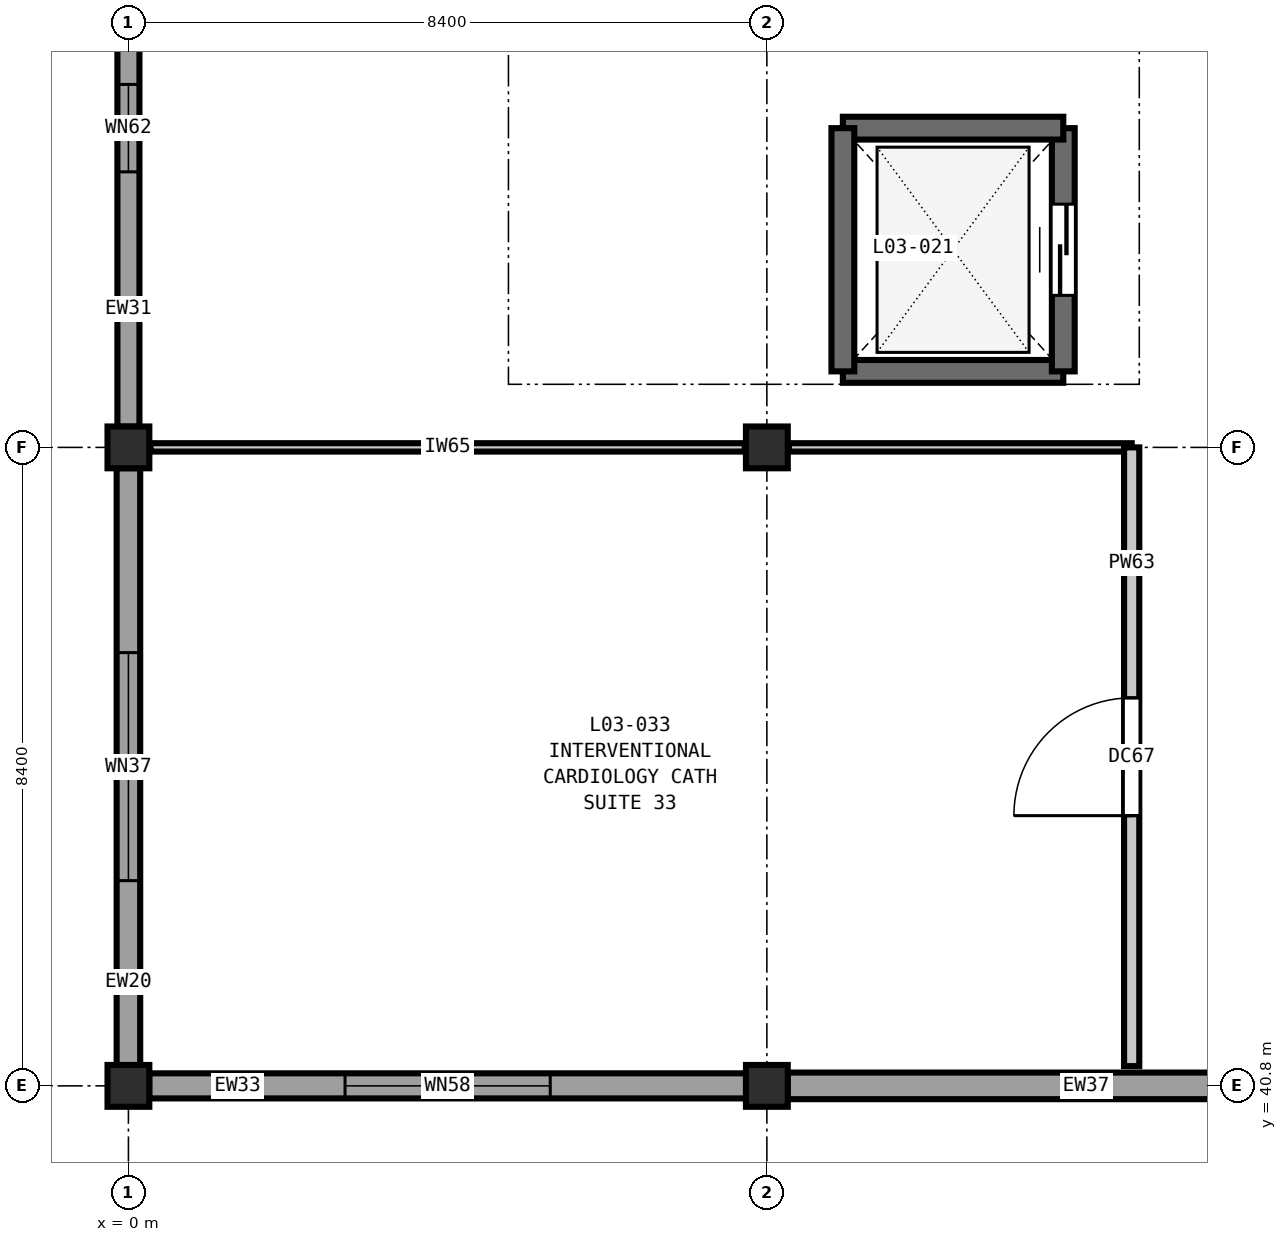
"""IFC4 building model, lengths in metres.
Left out: names, types, materials, properties, quantities, classifications, styles, units other than length and angle.
Written with IfcOpenShell. Run it as: python <this file> out.ifc"""

import sys

from ifc_helpers import new_model, si_unit, direction, frame, frame_2d, origin, origin_2d, place, context, subcontext, project, spatial, rectangle, extrude, element, fill, save


model = new_model("IFC4")
c1 = context("Model", 3, precision=1e-05, world=origin(), true_north=direction((0.0, 1.0)))
c2 = subcontext(c1, "Body", "Model", "MODEL_VIEW")
j1 = project(units=[si_unit("LENGTHUNIT", "METRE"), si_unit("PLANEANGLEUNIT", "RADIAN")], contexts=[c1])
p1 = place(None, origin())
s1 = spatial("IfcSite", under=j1, at=p1, CompositionType="ELEMENT")
p2 = place(p1, origin())
s2 = spatial("IfcBuilding", under=s1, at=p2, CompositionType="ELEMENT")
p3 = place(p2, frame((0.0, 0.0, 16.2)))
s3 = spatial("IfcBuildingStorey", under=s2, at=p3, CompositionType="ELEMENT", Elevation=16.2)
for number, where, z_axis, x_axis in (
    (1, (0.0, 40.8, 0.0), (0.0, 0.0, 1.0), (1.0, 0.0, 0.0)),
    (2, (0.0, 49.2, 0.0), (0.0, 0.0, 1.0), (1.0, 0.0, 0.0)),
    (3, (8.4, 40.8, 0.0), (0.0, 0.0, 1.0), (1.0, 0.0, 0.0)),
    (4, (8.4, 49.2, 0.0), (0.0, 0.0, 1.0), (1.0, 0.0, 0.0)),
):
    element("IfcColumn", number, at=place(p3, frame(where, z_axis=z_axis, x_axis=x_axis)), inside=s3, PredefinedType="COLUMN", context=c2, shape_type="SweptSolid", body=[
        extrude(rectangle(XDim=0.55, YDim=0.55, at=origin_2d()), origin(), (0.0, 0.0, 1.0), 4.2),
    ])
p4 = place(p3, frame((16.527, 40.8, 0.0), z_axis=(0.0, 0.0, 1.0), x_axis=(-1.0, 0.0, 0.0)))
e5 = element("IfcWall", 5, at=p4, inside=s3, PredefinedType="SOLIDWALL", context=c2, shape_type="SweptSolid", body=[
    extrude(rectangle(XDim=7.854, YDim=0.35, at=frame_2d((3.927, 0.0))), origin(), (0.0, 0.0, 1.0), 3.48),
])
p5 = place(p3, frame((8.127, 40.8, 0.0), z_axis=(0.0, 0.0, 1.0), x_axis=(-1.0, 0.0, 0.0)))
e6 = element("IfcWall", 6, at=p5, inside=s3, PredefinedType="SOLIDWALL", context=c2, shape_type="SweptSolid", body=[
    extrude(rectangle(XDim=7.854, YDim=0.33, at=frame_2d((3.927, 0.0))), origin(), (0.0, 0.0, 1.0), 3.48),
])
p6 = place(p5, frame((2.577, 0.0, 0.9)))
e7 = element("IfcOpeningElement", 7, at=p6, cuts=e6, PredefinedType="OPENING", context=c2, shape_type="SweptSolid", body=[
    extrude(rectangle(XDim=2.7, YDim=2.15, at=frame_2d((1.35, 1.075))), frame((0.0, 0.175, 0.0), z_axis=(0.0, -1.0, 0.0), x_axis=(1.0, 0.0, 0.0)), (0.0, 0.0, 1.0), 0.35),
])
p7 = place(p3, frame((0.0, 41.073, 0.0), z_axis=(0.0, 0.0, 1.0), x_axis=(0.0, 1.0, 0.0)))
e8 = element("IfcWall", 8, at=p7, inside=s3, PredefinedType="SOLIDWALL", context=c2, shape_type="SweptSolid", body=[
    extrude(rectangle(XDim=7.854, YDim=0.31, at=frame_2d((3.927, 0.0))), origin(), (0.0, 0.0, 1.0), 3.48),
])
p8 = place(p7, frame((2.427, 0.0, 0.9)))
e9 = element("IfcOpeningElement", 9, at=p8, cuts=e8, PredefinedType="OPENING", context=c2, shape_type="SweptSolid", body=[
    extrude(rectangle(XDim=3.0, YDim=2.15, at=frame_2d((1.5, 1.075))), frame((0.0, 0.165, 0.0), z_axis=(0.0, -1.0, 0.0), x_axis=(1.0, 0.0, 0.0)), (0.0, 0.0, 1.0), 0.33),
])
p9 = place(p3, frame((0.0, 49.473, 0.0), z_axis=(0.0, 0.0, 1.0), x_axis=(0.0, 1.0, 0.0)))
e10 = element("IfcWall", 10, at=p9, inside=s3, PredefinedType="SOLIDWALL", context=c2, shape_type="SweptSolid", body=[
    extrude(rectangle(XDim=7.854, YDim=0.29, at=frame_2d((3.927, 0.0))), origin(), (0.0, 0.0, 1.0), 3.48),
])
p10 = place(p9, frame((3.352, 0.0, 0.9)))
e11 = element("IfcOpeningElement", 11, at=p10, cuts=e10, PredefinedType="OPENING", context=c2, shape_type="SweptSolid", body=[
    extrude(rectangle(XDim=1.15, YDim=1.4, at=frame_2d((0.575, 0.7))), frame((0.0, 0.155, 0.0), z_axis=(0.0, -1.0, 0.0), x_axis=(1.0, 0.0, 0.0)), (0.0, 0.0, 1.0), 0.31),
])
p11 = place(p3, frame((9.4, 50.2, 0.0), z_axis=(0.0, 0.0, 1.0), x_axis=(1.0, 0.0, 0.0)))
e12 = element("IfcWall", 12, at=p11, inside=s3, PredefinedType="SHEAR", context=c2, shape_type="SweptSolid", body=[
    extrude(rectangle(XDim=2.9, YDim=0.3, at=frame_2d((1.45, 0.0))), origin(), (0.0, 0.0, 1.0), 4.2),
])
p12 = place(p3, frame((12.3, 50.2, 0.0), z_axis=(0.0, 0.0, 1.0), x_axis=(0.0, 1.0, 0.0)))
e13 = element("IfcWall", 13, at=p12, inside=s3, PredefinedType="SHEAR", context=c2, shape_type="SweptSolid", body=[
    extrude(rectangle(XDim=3.2, YDim=0.3, at=frame_2d((1.6, 0.0))), origin(), (0.0, 0.0, 1.0), 4.2),
])
p13 = place(p12, frame((1.0, 0.0, 0.0)))
e14 = element("IfcOpeningElement", 14, at=p13, cuts=e13, PredefinedType="OPENING", context=c2, shape_type="SweptSolid", body=[
    extrude(rectangle(XDim=1.2, YDim=2.2, at=frame_2d((0.6, 1.1))), frame((0.0, 0.16, 0.0), z_axis=(0.0, -1.0, 0.0), x_axis=(1.0, 0.0, 0.0)), (0.0, 0.0, 1.0), 0.32),
])
p14 = place(p3, frame((12.3, 53.4, 0.0), z_axis=(0.0, 0.0, 1.0), x_axis=(-1.0, 0.0, 0.0)))
e15 = element("IfcWall", 15, at=p14, inside=s3, PredefinedType="SHEAR", context=c2, shape_type="SweptSolid", body=[
    extrude(rectangle(XDim=2.9, YDim=0.3, at=frame_2d((1.45, 0.0))), origin(), (0.0, 0.0, 1.0), 4.2),
])
p15 = place(p3, frame((9.4, 53.4, 0.0), z_axis=(0.0, 0.0, 1.0), x_axis=(0.0, -1.0, 0.0)))
e16 = element("IfcWall", 16, at=p15, inside=s3, PredefinedType="SHEAR", context=c2, shape_type="SweptSolid", body=[
    extrude(rectangle(XDim=3.2, YDim=0.3, at=frame_2d((1.6, 0.0))), origin(), (0.0, 0.0, 1.0), 4.2),
])
p16 = place(p3, frame((0.29, 49.2, 0.0), z_axis=(0.0, 0.0, 1.0), x_axis=(1.0, 0.0, 0.0)))
e17 = element("IfcWall", 17, at=p16, inside=s3, PredefinedType="PARTITIONING", context=c2, shape_type="SweptSolid", body=[
    extrude(rectangle(XDim=7.82, YDim=0.11, at=frame_2d((3.91, 0.0))), origin(), (0.0, 0.0, 1.0), 3.535),
])
p17 = place(p3, frame((8.69, 49.2, 0.0), z_axis=(0.0, 0.0, 1.0), x_axis=(1.0, 0.0, 0.0)))
e18 = element("IfcWall", 18, at=p17, inside=s3, PredefinedType="PARTITIONING", context=c2, shape_type="SweptSolid", body=[
    extrude(rectangle(XDim=4.51, YDim=0.11, at=frame_2d((2.255, 0.0))), origin(), (0.0, 0.0, 1.0), 3.535),
])
p18 = place(p3, frame((13.2, 41.06, 0.0), z_axis=(0.0, 0.0, 1.0), x_axis=(0.0, 1.0, 0.0)))
e19 = element("IfcWall", 19, at=p18, inside=s3, PredefinedType="PARTITIONING", context=c2, shape_type="SweptSolid", body=[
    extrude(rectangle(XDim=8.14, YDim=0.2, at=frame_2d((4.07, 0.0))), origin(), (0.0, 0.0, 1.0), 3.89),
])
p19 = place(p18, frame((3.295, 0.0, 0.0)))
e20 = element("IfcOpeningElement", 20, at=p19, cuts=e19, PredefinedType="OPENING", context=c2, shape_type="SweptSolid", body=[
    extrude(rectangle(XDim=1.55, YDim=2.25, at=frame_2d((0.775, 1.125))), frame((0.0, 0.11, 0.0), z_axis=(0.0, -1.0, 0.0), x_axis=(1.0, 0.0, 0.0)), (0.0, 0.0, 1.0), 0.22),
])
p20 = place(p6, origin())
e21 = element("IfcWindow", 21, at=p20, inside=s3, PartitioningType="DOUBLE_PANEL_VERTICAL", PredefinedType="WINDOW", context=c2, shape_type="SweptSolid", body=[
    extrude(rectangle(XDim=2.7, YDim=2.15, at=frame_2d((1.35, 1.075))), frame((0.0, 0.03, 0.0), z_axis=(0.0, -1.0, 0.0), x_axis=(1.0, 0.0, 0.0)), (0.0, 0.0, 1.0), 0.06),
])
fill(e7, e21)
p21 = place(p8, origin())
e22 = element("IfcWindow", 22, at=p21, inside=s3, PartitioningType="DOUBLE_PANEL_VERTICAL", PredefinedType="WINDOW", context=c2, shape_type="SweptSolid", body=[
    extrude(rectangle(XDim=3.0, YDim=2.15, at=frame_2d((1.5, 1.075))), frame((0.0, 0.03, 0.0), z_axis=(0.0, -1.0, 0.0), x_axis=(1.0, 0.0, 0.0)), (0.0, 0.0, 1.0), 0.06),
])
fill(e9, e22)
p22 = place(p10, origin())
e23 = element("IfcWindow", 23, at=p22, inside=s3, PartitioningType="SINGLE_PANEL", PredefinedType="WINDOW", context=c2, shape_type="SweptSolid", body=[
    extrude(rectangle(XDim=1.15, YDim=1.4, at=frame_2d((0.575, 0.7))), frame((0.0, 0.03, 0.0), z_axis=(0.0, -1.0, 0.0), x_axis=(1.0, 0.0, 0.0)), (0.0, 0.0, 1.0), 0.06),
])
fill(e11, e23)
p23 = place(p13, origin())
e24 = element("IfcDoor", 24, at=p23, inside=s3, OperationType="DOUBLE_DOOR_SLIDING", PredefinedType="DOOR", context=c2, shape_type="SweptSolid", body=[
    extrude(rectangle(XDim=1.2, YDim=2.2, at=frame_2d((0.6, 1.1))), frame((0.0, 0.025, 0.0), z_axis=(0.0, -1.0, 0.0), x_axis=(1.0, 0.0, 0.0)), (0.0, 0.0, 1.0), 0.05),
])
fill(e14, e24)
p24 = place(p19, origin())
e25 = element("IfcDoor", 25, at=p24, inside=s3, OperationType="SINGLE_SWING_LEFT", PredefinedType="DOOR", context=c2, shape_type="SweptSolid", body=[
    extrude(rectangle(XDim=1.55, YDim=2.25, at=frame_2d((0.775, 1.125))), frame((0.0, 0.025, 0.0), z_axis=(0.0, -1.0, 0.0), x_axis=(1.0, 0.0, 0.0)), (0.0, 0.0, 1.0), 0.05),
])
fill(e20, e25)
save(model, sys.argv[1])
